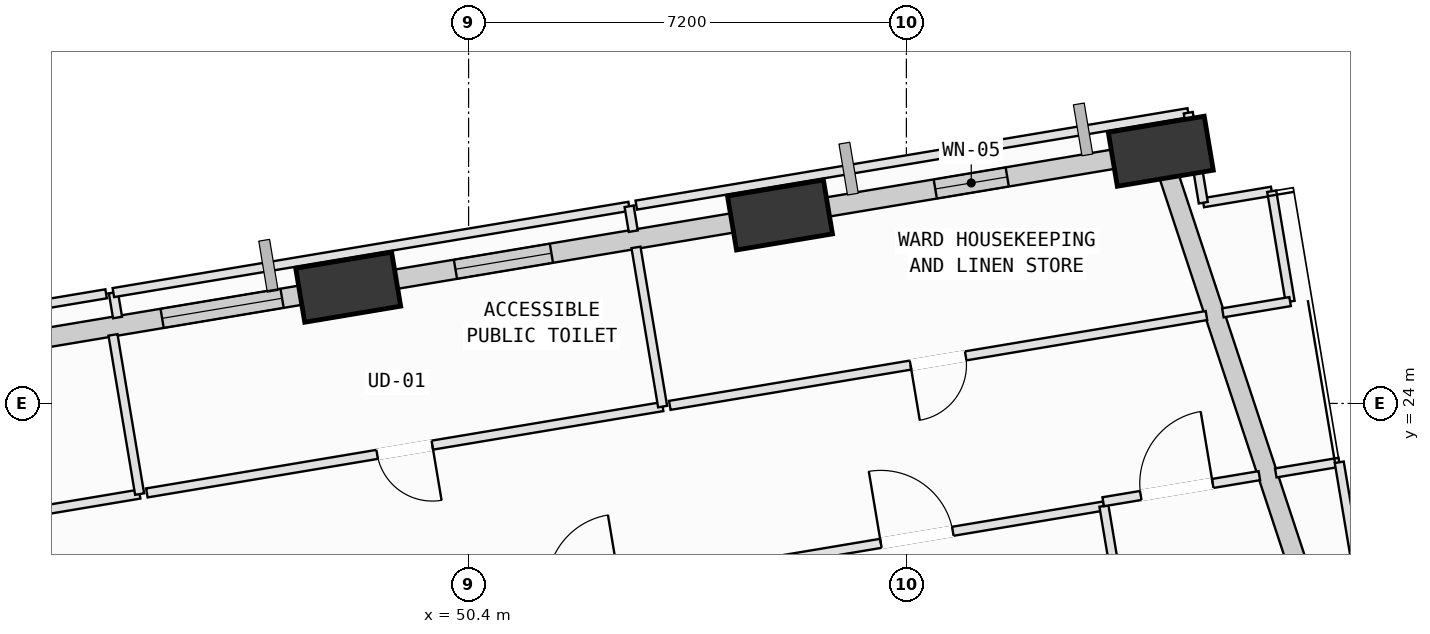
"""IFC4 building model, lengths in metres.
Left out: names, types, materials, properties, quantities, classifications, styles, units other than length and angle.
Written with IfcOpenShell. Run it as: python <this file> out.ifc"""

import sys

from ifc_helpers import new_model, si_unit, direction, frame, frame_2d, origin, origin_2d, place, context, subcontext, project, spatial, rectangle, extrude, element, fill, save


model = new_model("IFC4")
c1 = context("Model", 3, precision=1e-05, world=origin(), true_north=direction((0.0, 1.0)))
c2 = subcontext(c1, "Body", "Model", "MODEL_VIEW")
j1 = project(units=[si_unit("LENGTHUNIT", "METRE"), si_unit("PLANEANGLEUNIT", "RADIAN")], contexts=[c1])
p1 = place(None, origin())
s1 = spatial("IfcSite", under=j1, at=p1, CompositionType="ELEMENT")
p2 = place(p1, origin())
s2 = spatial("IfcBuilding", under=s1, at=p2, CompositionType="ELEMENT")
p3 = place(p2, frame((0.0, 0.0, 63.0)))
s3 = spatial("IfcBuildingStorey", under=s2, at=p3, CompositionType="ELEMENT", Elevation=63.0)
p4 = place(p3, frame((61.784, 28.148, 0.002), z_axis=(-0.01474250043, 0.115937935478, 0.993147045406), x_axis=(-0.957730345813, -0.287020043353, 0.019289360343)))
e1 = element("IfcColumn", 1, at=p4, inside=s3, PredefinedType="COLUMN", context=c2, shape_type="SweptSolid", body=[
    extrude(rectangle(XDim=1.6, YDim=0.9, at=origin_2d()), origin(), (0.0, 0.0, 1.0), 4.024),
])
p5 = place(p3, frame((55.521, 27.1, 0.002), z_axis=(-0.010220061656, 0.090459712398, 0.995847674483), x_axis=(-0.961598490358, -0.274048514704, 0.015025143249)))
e2 = element("IfcColumn", 2, at=p5, inside=s3, PredefinedType="COLUMN", context=c2, shape_type="SweptSolid", body=[
    extrude(rectangle(XDim=1.6, YDim=0.9, at=origin_2d()), origin(), (0.0, 0.0, 1.0), 4.013),
])
p6 = place(p3, frame((48.42, 25.911, 0.002), z_axis=(-0.005121627691, 0.061276617016, 0.998107682135), x_axis=(-0.969137393668, -0.246312227806, 0.010148823939)))
e3 = element("IfcColumn", 3, at=p6, inside=s3, PredefinedType="COLUMN", context=c2, shape_type="SweptSolid", body=[
    extrude(rectangle(XDim=1.6, YDim=0.9, at=origin_2d()), origin(), (0.0, 0.0, 1.0), 4.004),
])
p7 = place(p3, frame((61.902, 27.791, 0.0), z_axis=(0.0, 0.0, 1.0), x_axis=(0.313820376778, -0.949482370094, 0.0)))
e4 = element("IfcWall", 4, at=p7, inside=s3, PredefinedType="SOLIDWALL", context=c2, shape_type="SweptSolid", body=[
    extrude(rectangle(XDim=8.614, YDim=0.32, at=frame_2d((4.307, 0.0))), origin(), (0.0, 0.0, 1.0), 3.165),
])
p8 = place(p3, frame((56.103, 27.197, 0.0), z_axis=(0.0, 0.0, 1.0), x_axis=(0.986289857367, 0.165022172011, 0.0)))
e5 = element("IfcWall", 5, at=p8, inside=s3, PredefinedType="SOLIDWALL", context=c2, shape_type="SweptSolid", body=[
    extrude(rectangle(XDim=5.209, YDim=0.32, at=frame_2d((2.604, 0.0))), origin(), (0.0, 0.0, 1.0), 3.165),
])
p9 = place(p8, frame((2.0, 0.0, 0.75)))
e6 = element("IfcOpeningElement", 6, at=p9, cuts=e5, PredefinedType="OPENING", context=c2, shape_type="SweptSolid", body=[
    extrude(rectangle(XDim=1.2, YDim=1.75, at=frame_2d((0.6, 0.875))), frame((0.0, 0.17, 0.0), z_axis=(0.0, -1.0, 0.0), x_axis=(1.0, 0.0, 0.0)), (0.0, 0.0, 1.0), 0.34),
])
p10 = place(p3, frame((49.017, 26.011, 0.0), z_axis=(0.0, 0.0, 1.0), x_axis=(0.98628307528, 0.165062701468, 0.0)))
e7 = element("IfcWall", 7, at=p10, inside=s3, PredefinedType="SOLIDWALL", context=c2, shape_type="SweptSolid", body=[
    extrude(rectangle(XDim=6.024, YDim=0.32, at=frame_2d((3.012, 0.0))), origin(), (0.0, 0.0, 1.0), 3.165),
])
p11 = place(p10, frame((1.183, 0.0, 0.75)))
e8 = element("IfcOpeningElement", 8, at=p11, cuts=e7, PredefinedType="OPENING", context=c2, shape_type="SweptSolid", body=[
    extrude(rectangle(XDim=1.6, YDim=1.95, at=frame_2d((0.8, 0.975))), frame((0.0, 0.17, 0.0), z_axis=(0.0, -1.0, 0.0), x_axis=(1.0, 0.0, 0.0)), (0.0, 0.0, 1.0), 0.34),
])
p12 = place(p3, frame((41.925, 24.824, 0.0), z_axis=(0.0, 0.0, 1.0), x_axis=(0.986285933786, 0.165045620407, 0.0)))
e9 = element("IfcWall", 9, at=p12, inside=s3, PredefinedType="SOLIDWALL", context=c2, shape_type="SweptSolid", body=[
    extrude(rectangle(XDim=6.0, YDim=0.32, at=frame_2d((3.0, 0.0))), origin(), (0.0, 0.0, 1.0), 3.165),
])
p13 = place(p12, frame((3.482, 0.0, 0.75)))
e10 = element("IfcOpeningElement", 10, at=p13, cuts=e9, PredefinedType="OPENING", context=c2, shape_type="SweptSolid", body=[
    extrude(rectangle(XDim=2.0, YDim=1.95, at=frame_2d((1.0, 0.975))), frame((0.0, 0.17, 0.0), z_axis=(0.0, -1.0, 0.0), x_axis=(1.0, 0.0, 0.0)), (0.0, 0.0, 1.0), 0.34),
])
p14 = place(p3, frame((54.695, 21.283, 0.0), z_axis=(0.0, 0.0, 1.0), x_axis=(0.986280538422, 0.165077858992, 0.0)))
e11 = element("IfcWall", 11, at=p14, inside=s3, PredefinedType="PARTITIONING", context=c2, shape_type="SweptSolid", body=[
    extrude(rectangle(XDim=6.24, YDim=0.15, at=frame_2d((3.12, 0.0))), origin(), (0.0, 0.0, 1.0), 3.78),
])
p15 = place(p14, frame((2.52, 0.0, 0.0)))
e12 = element("IfcOpeningElement", 12, at=p15, cuts=e11, PredefinedType="OPENING", context=c2, shape_type="SweptSolid", body=[
    extrude(rectangle(XDim=1.2, YDim=2.15, at=frame_2d((0.6, 1.075))), frame((0.0, 0.085, 0.0), z_axis=(0.0, -1.0, 0.0), x_axis=(1.0, 0.0, 0.0)), (0.0, 0.0, 1.0), 0.17),
])
p16 = place(p3, frame((60.849, 22.313, 0.0), z_axis=(0.0, 0.0, 1.0), x_axis=(0.1650362801, -0.986287496753, 0.0)))
e13 = element("IfcWall", 13, at=p16, inside=s3, PredefinedType="PARTITIONING", context=c2, shape_type="SweptSolid", body=[
    extrude(rectangle(XDim=15.53, YDim=0.15, at=frame_2d((7.765, 0.0))), origin(), (0.0, 0.0, 1.0), 3.78),
])
p17 = place(p3, frame((44.99, 22.509, 0.0), z_axis=(0.0, 0.0, 1.0), x_axis=(-0.986271610427, -0.165131191679, 0.0)))
e14 = element("IfcWall", 14, at=p17, inside=s3, PredefinedType="PARTITIONING", context=c2, shape_type="SweptSolid", body=[
    extrude(rectangle(XDim=8.164, YDim=0.15, at=frame_2d((4.082, 0.0))), origin(), (0.0, 0.0, 1.0), 3.78),
])
p18 = place(p17, frame((3.482, 0.0, 0.0)))
e15 = element("IfcOpeningElement", 15, at=p18, cuts=e14, PredefinedType="OPENING", context=c2, shape_type="SweptSolid", body=[
    extrude(rectangle(XDim=1.2, YDim=2.15, at=frame_2d((0.6, 1.075))), frame((0.0, 0.085, 0.0), z_axis=(0.0, -1.0, 0.0), x_axis=(1.0, 0.0, 0.0)), (0.0, 0.0, 1.0), 0.17),
])
p19 = place(p3, frame((36.387, 24.455, 0.0), z_axis=(0.0, 0.0, 1.0), x_axis=(0.986276480352, 0.165102102666, 0.0)))
e16 = element("IfcWall", 16, at=p19, inside=s3, PredefinedType="PARTITIONING", context=c2, shape_type="SweptSolid", body=[
    extrude(rectangle(XDim=8.164, YDim=0.15, at=frame_2d((4.082, 0.0))), origin(), (0.0, 0.0, 1.0), 3.165),
])
p20 = place(p3, frame((44.552, 25.127, 0.0), z_axis=(0.0, 0.0, 1.0), x_axis=(0.165010492381, -0.986291811486, 0.0)))
e17 = element("IfcWall", 17, at=p20, inside=s3, PredefinedType="PARTITIONING", context=c2, shape_type="SweptSolid", body=[
    extrude(rectangle(XDim=2.654, YDim=0.15, at=frame_2d((1.327, 0.0))), origin(), (0.0, 0.0, 1.0), 3.78),
])
p21 = place(p3, frame((53.591, 23.948, 0.0), z_axis=(0.0, 0.0, 1.0), x_axis=(-0.986276285111, -0.165103268981, 0.0)))
e18 = element("IfcWall", 18, at=p21, inside=s3, PredefinedType="PARTITIONING", context=c2, shape_type="SweptSolid", body=[
    extrude(rectangle(XDim=8.6, YDim=0.15, at=frame_2d((4.3, 0.0))), origin(), (0.0, 0.0, 1.0), 3.78),
])
p22 = place(p21, frame((3.84, 0.0, 0.0)))
e19 = element("IfcOpeningElement", 19, at=p22, cuts=e18, PredefinedType="OPENING", context=c2, shape_type="SweptSolid", body=[
    extrude(rectangle(XDim=0.92, YDim=2.1, at=frame_2d((0.46, 1.05))), frame((0.0, 0.085, 0.0), z_axis=(0.0, -1.0, 0.0), x_axis=(1.0, 0.0, 0.0)), (0.0, 0.0, 1.0), 0.17),
])
p23 = place(p3, frame((44.627, 25.413, 0.0), z_axis=(0.0, 0.0, 1.0), x_axis=(-0.165637087874, 0.986186774967, 0.0)))
e20 = element("IfcWall", 20, at=p23, inside=s3, PredefinedType="PARTITIONING", context=c2, shape_type="SweptSolid", body=[
    extrude(rectangle(XDim=0.416, YDim=0.15, at=frame_2d((0.208, 0.0))), origin(), (0.0, 0.0, 1.0), 3.78),
])
p24 = place(p3, frame((44.558, 25.823, 0.0), z_axis=(0.0, 0.0, 1.0), x_axis=(0.986293996802, 0.164997429895, 0.0)))
e21 = element("IfcWall", 21, at=p24, inside=s3, PredefinedType="PARTITIONING", context=c2, shape_type="SweptSolid", body=[
    extrude(rectangle(XDim=8.6, YDim=0.15, at=frame_2d((4.3, 0.0))), origin(), (0.0, 0.0, 1.0), 3.165),
])
p25 = place(p3, frame((53.04, 27.242, 0.0), z_axis=(0.0, 0.0, 1.0), x_axis=(0.163730402307, -0.986505121812, 0.0)))
e22 = element("IfcWall", 22, at=p25, inside=s3, PredefinedType="PARTITIONING", context=c2, shape_type="SweptSolid", body=[
    extrude(rectangle(XDim=0.415, YDim=0.15, at=frame_2d((0.207, 0.0))), origin(), (0.0, 0.0, 1.0), 3.78),
])
p26 = place(p3, frame((53.153, 26.566, 0.0), z_axis=(0.0, 0.0, 1.0), x_axis=(0.165010492381, -0.986291811486, 0.0)))
e23 = element("IfcWall", 23, at=p26, inside=s3, PredefinedType="PARTITIONING", context=c2, shape_type="SweptSolid", body=[
    extrude(rectangle(XDim=2.654, YDim=0.15, at=frame_2d((1.327, 0.0))), origin(), (0.0, 0.0, 1.0), 3.78),
])
p27 = place(p3, frame((62.483, 27.301, 0.0), z_axis=(0.0, 0.0, 1.0), x_axis=(0.98618490097, 0.165648245085, 0.0)))
e24 = element("IfcWall", 24, at=p27, inside=s3, PredefinedType="PARTITIONING", context=c2, shape_type="SweptSolid", body=[
    extrude(rectangle(XDim=1.141, YDim=0.15, at=frame_2d((0.57, 0.0))), origin(), (0.0, 0.0, 1.0), 3.78),
])
p28 = place(p3, frame((63.608, 27.49, 0.0), z_axis=(0.0, 0.0, 1.0), x_axis=(0.164657171807, -0.986350858352, 0.0)))
e25 = element("IfcWall", 25, at=p28, inside=s3, PredefinedType="PARTITIONING", context=c2, shape_type="SweptSolid", body=[
    extrude(rectangle(XDim=1.84, YDim=0.15, at=frame_2d((0.92, 0.0))), origin(), (0.0, 0.0, 1.0), 3.78),
])
p29 = place(p3, frame((63.911, 25.675, 0.0), z_axis=(0.0, 0.0, 1.0), x_axis=(-0.986287799528, -0.165034470649, 0.0)))
e26 = element("IfcWall", 26, at=p29, inside=s3, PredefinedType="PARTITIONING", context=c2, shape_type="SweptSolid", body=[
    extrude(rectangle(XDim=1.121, YDim=0.15, at=frame_2d((0.561, 0.0))), origin(), (0.0, 0.0, 1.0), 3.78),
])
p30 = place(p3, frame((62.535, 25.445, 0.0), z_axis=(0.0, 0.0, 1.0), x_axis=(-0.986283836846, -0.165058150893, 0.0)))
e27 = element("IfcWall", 27, at=p30, inside=s3, PredefinedType="PARTITIONING", context=c2, shape_type="SweptSolid", body=[
    extrude(rectangle(XDim=8.949, YDim=0.15, at=frame_2d((4.474, 0.0))), origin(), (0.0, 0.0, 1.0), 3.78),
])
p31 = place(p30, frame((4.014, 0.0, 0.0)))
e28 = element("IfcOpeningElement", 28, at=p31, cuts=e27, PredefinedType="OPENING", context=c2, shape_type="SweptSolid", body=[
    extrude(rectangle(XDim=0.92, YDim=2.1, at=frame_2d((0.46, 1.05))), frame((0.0, 0.085, 0.0), z_axis=(0.0, -1.0, 0.0), x_axis=(1.0, 0.0, 0.0)), (0.0, 0.0, 1.0), 0.17),
])
p32 = place(p3, frame((53.158, 27.262, 0.0), z_axis=(0.0, 0.0, 1.0), x_axis=(0.986287620349, 0.165035541464, 0.0)))
e29 = element("IfcWall", 29, at=p32, inside=s3, PredefinedType="PARTITIONING", context=c2, shape_type="SweptSolid", body=[
    extrude(rectangle(XDim=9.204, YDim=0.15, at=frame_2d((4.602, 0.0))), origin(), (0.0, 0.0, 1.0), 3.165),
])
p33 = place(p3, frame((62.236, 28.781, 0.0), z_axis=(0.0, 0.0, 1.0), x_axis=(0.164504531015, -0.98637632741, 0.0)))
e30 = element("IfcWall", 30, at=p33, inside=s3, PredefinedType="PARTITIONING", context=c2, shape_type="SweptSolid", body=[
    extrude(rectangle(XDim=1.5, YDim=0.15, at=frame_2d((0.75, 0.0))), origin(), (0.0, 0.0, 1.0), 3.165),
])
p34 = place(p3, frame((60.837, 22.383, 0.0), z_axis=(0.0, 0.0, 1.0), x_axis=(0.98633557421, 0.164748702718, 0.0)))
e31 = element("IfcWall", 31, at=p34, inside=s3, PredefinedType="PARTITIONING", context=c2, shape_type="SweptSolid", body=[
    extrude(rectangle(XDim=2.604, YDim=0.15, at=frame_2d((1.302, 0.0))), origin(), (0.0, 0.0, 1.0), 3.78),
])
p35 = place(p34, frame((0.626, 0.0, 0.0)))
e32 = element("IfcOpeningElement", 32, at=p35, cuts=e31, PredefinedType="OPENING", context=c2, shape_type="SweptSolid", body=[
    extrude(rectangle(XDim=1.2, YDim=2.15, at=frame_2d((0.6, 1.075))), frame((0.0, 0.085, 0.0), z_axis=(0.0, -1.0, 0.0), x_axis=(1.0, 0.0, 0.0)), (0.0, 0.0, 1.0), 0.17),
])
p36 = place(p3, frame((63.675, 22.857, 0.0), z_axis=(0.0, 0.0, 1.0), x_axis=(0.986231370716, 0.165371350047, 0.0)))
e33 = element("IfcWall", 33, at=p36, inside=s3, PredefinedType="PARTITIONING", context=c2, shape_type="SweptSolid", body=[
    extrude(rectangle(XDim=1.059, YDim=0.15, at=frame_2d((0.529, 0.0))), origin(), (0.0, 0.0, 1.0), 3.78),
])
p37 = place(p3, frame((64.719, 23.032, 0.0), z_axis=(0.0, 0.0, 1.0), x_axis=(0.165020998917, -0.986290053644, 0.0)))
e34 = element("IfcWall", 34, at=p37, inside=s3, PredefinedType="PARTITIONING", context=c2, shape_type="SweptSolid", body=[
    extrude(rectangle(XDim=12.92, YDim=0.15, at=frame_2d((6.46, 0.0))), origin(), (0.0, 0.0, 1.0), 3.165),
])
p38 = place(p9, origin())
e35 = element("IfcWindow", 35, at=p38, inside=s3, PartitioningType="SINGLE_PANEL", PredefinedType="WINDOW", context=c2, shape_type="SweptSolid", body=[
    extrude(rectangle(XDim=1.2, YDim=1.75, at=frame_2d((0.6, 0.875))), frame((0.0, 0.03, 0.0), z_axis=(0.0, -1.0, 0.0), x_axis=(1.0, 0.0, 0.0)), (0.0, 0.0, 1.0), 0.06),
])
fill(e6, e35)
p39 = place(p11, origin())
e36 = element("IfcWindow", 36, at=p39, inside=s3, PartitioningType="SINGLE_PANEL", PredefinedType="WINDOW", context=c2, shape_type="SweptSolid", body=[
    extrude(rectangle(XDim=1.6, YDim=1.95, at=frame_2d((0.8, 0.975))), frame((0.0, 0.03, 0.0), z_axis=(0.0, -1.0, 0.0), x_axis=(1.0, 0.0, 0.0)), (0.0, 0.0, 1.0), 0.06),
])
fill(e8, e36)
p40 = place(p13, origin())
e37 = element("IfcWindow", 37, at=p40, inside=s3, PartitioningType="SINGLE_PANEL", PredefinedType="WINDOW", context=c2, shape_type="SweptSolid", body=[
    extrude(rectangle(XDim=2.0, YDim=1.95, at=frame_2d((1.0, 0.975))), frame((0.0, 0.03, 0.0), z_axis=(0.0, -1.0, 0.0), x_axis=(1.0, 0.0, 0.0)), (0.0, 0.0, 1.0), 0.06),
])
fill(e10, e37)
p41 = place(p15, origin())
e38 = element("IfcDoor", 38, at=p41, inside=s3, OperationType="SINGLE_SWING_LEFT", PredefinedType="DOOR", context=c2, shape_type="SweptSolid", body=[
    extrude(rectangle(XDim=1.2, YDim=2.15, at=frame_2d((0.6, 1.075))), frame((0.0, 0.025, 0.0), z_axis=(0.0, -1.0, 0.0), x_axis=(1.0, 0.0, 0.0)), (0.0, 0.0, 1.0), 0.05),
])
fill(e12, e38)
p42 = place(p22, origin())
e39 = element("IfcDoor", 39, at=p42, inside=s3, OperationType="SINGLE_SWING_LEFT", PredefinedType="DOOR", context=c2, shape_type="SweptSolid", body=[
    extrude(rectangle(XDim=0.92, YDim=2.1, at=frame_2d((0.46, 1.05))), frame((0.0, 0.025, 0.0), z_axis=(0.0, -1.0, 0.0), x_axis=(1.0, 0.0, 0.0)), (0.0, 0.0, 1.0), 0.05),
])
fill(e19, e39)
p43 = place(p31, origin())
e40 = element("IfcDoor", 40, at=p43, inside=s3, OperationType="SINGLE_SWING_RIGHT", PredefinedType="DOOR", context=c2, shape_type="SweptSolid", body=[
    extrude(rectangle(XDim=0.92, YDim=2.1, at=frame_2d((0.46, 1.05))), frame((0.0, 0.025, 0.0), z_axis=(0.0, -1.0, 0.0), x_axis=(1.0, 0.0, 0.0)), (0.0, 0.0, 1.0), 0.05),
])
fill(e28, e40)
p44 = place(p35, origin())
e41 = element("IfcDoor", 41, at=p44, inside=s3, OperationType="SINGLE_SWING_RIGHT", PredefinedType="DOOR", context=c2, shape_type="SweptSolid", body=[
    extrude(rectangle(XDim=1.2, YDim=2.15, at=frame_2d((0.6, 1.075))), frame((0.0, 0.025, 0.0), z_axis=(0.0, -1.0, 0.0), x_axis=(1.0, 0.0, 0.0)), (0.0, 0.0, 1.0), 0.05),
])
fill(e32, e41)
save(model, sys.argv[1])
